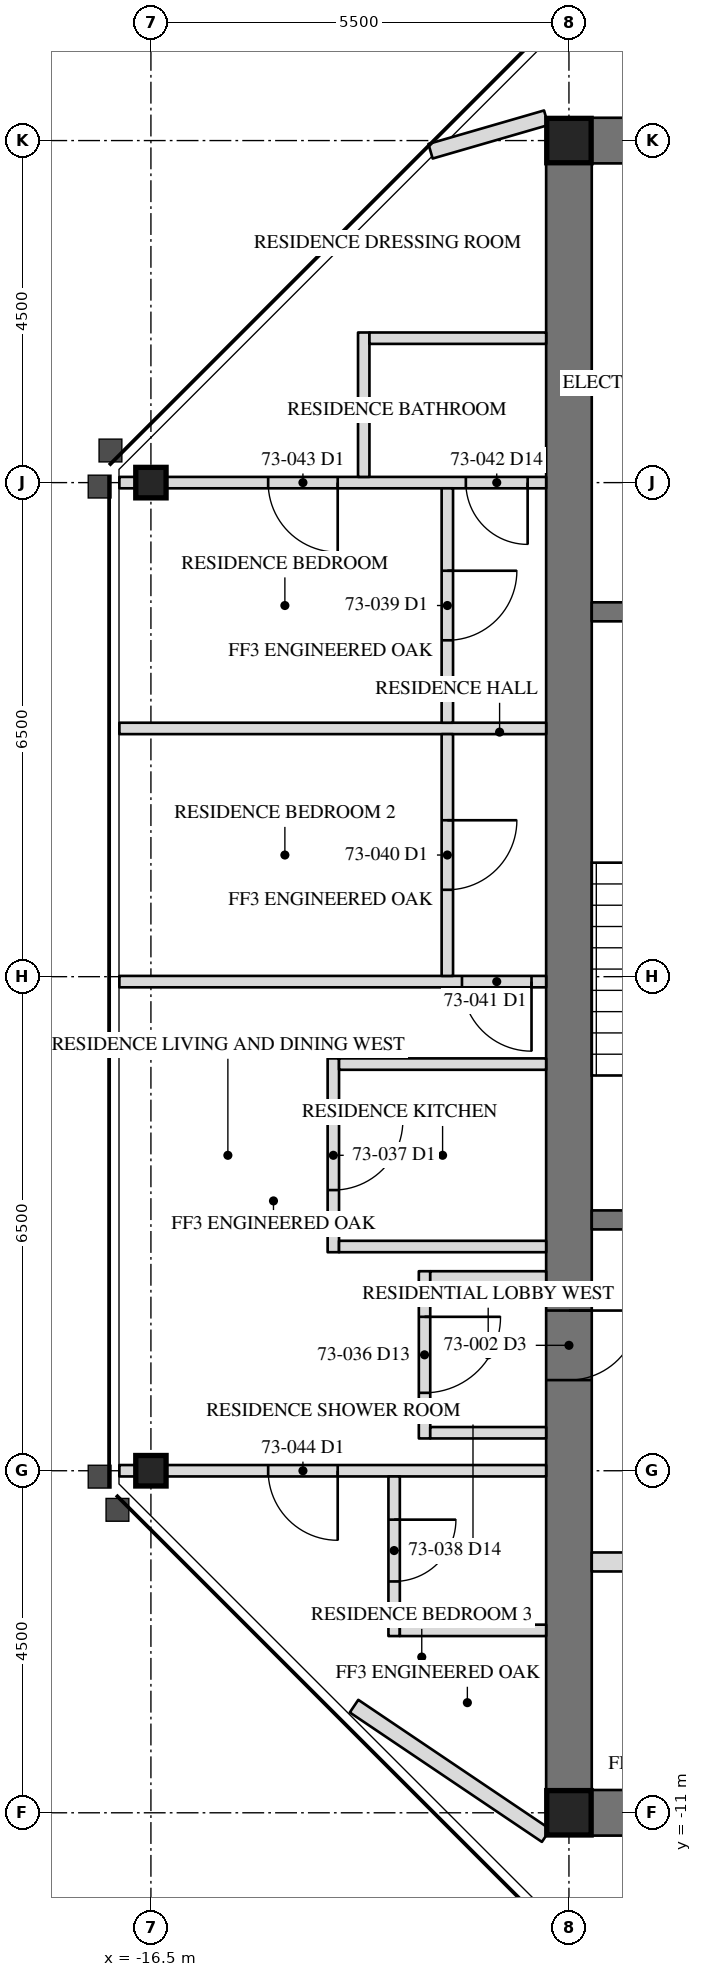
"""IFC4 building model, lengths in metres.
Left out: names, types, materials, properties, quantities, classifications, styles, units other than length and angle.
Written with IfcOpenShell. Run it as: python <this file> out.ifc"""

import sys

from ifc_helpers import new_model, si_unit, direction, frame, frame_2d, origin, origin_2d, place, context, subcontext, project, spatial, rectangle, hollow_rectangle, i_section, extrude, element, fill, save


model = new_model("IFC4")
c1 = context("Model", 3, precision=1e-05, world=origin(), true_north=direction((0.0, 1.0)))
c2 = subcontext(c1, "Body", "Model", "MODEL_VIEW")
j1 = project(units=[si_unit("LENGTHUNIT", "METRE"), si_unit("PLANEANGLEUNIT", "RADIAN")], contexts=[c1])
p1 = place(None, origin())
s1 = spatial("IfcSite", under=j1, at=p1, CompositionType="ELEMENT")
p2 = place(p1, origin())
s2 = spatial("IfcBuilding", under=s1, at=p2, CompositionType="ELEMENT")
p3 = place(p2, frame((0.0, 0.0, 295.6)))
s3 = spatial("IfcBuildingStorey", under=s2, at=p3, CompositionType="ELEMENT", Elevation=295.6)
for number, where, z_axis, x_axis in (
    (1, (-16.5, -6.5, 0.0), (0.0, 0.0, 1.0), (0.0, 1.0, 0.0)),
    (2, (-16.5, 6.5, 0.0), (0.0, 0.0, 1.0), (0.0, 1.0, 0.0)),
):
    element("IfcColumn", number, at=place(p3, frame(where, z_axis=z_axis, x_axis=x_axis)), inside=s3, PredefinedType="COLUMN", context=c2, shape_type="SweptSolid", body=[
        extrude(i_section(OverallWidth=0.401, OverallDepth=0.399, WebThickness=0.025, FlangeThickness=0.04, at=origin_2d()), origin(), (0.0, 0.0, 1.0), 3.6),
    ])
p4 = place(p3, frame((-11.0, 11.0, 0.0), z_axis=(0.0, 0.0, 1.0), x_axis=(0.0, -1.0, 0.0)))
e3 = element("IfcWall", 3, at=p4, inside=s3, PredefinedType="SHEAR", context=c2, shape_type="SweptSolid", body=[
    extrude(rectangle(XDim=22.0, YDim=0.6, at=frame_2d((11.0, 0.0))), origin(), (0.0, 0.0, 1.0), 3.6),
])
p5 = place(p4, frame((15.393, 0.0, 0.0)))
e4 = element("IfcOpeningElement", 4, at=p5, cuts=e3, PredefinedType="OPENING", context=c2, shape_type="SweptSolid", body=[
    extrude(rectangle(XDim=0.915, YDim=2.134, at=frame_2d((0.458, 1.067))), frame((0.0, 0.31, 0.0), z_axis=(0.0, -1.0, 0.0), x_axis=(1.0, 0.0, 0.0)), (0.0, 0.0, 1.0), 0.62),
])
for number, where, z_axis, x_axis in (
    (5, (-6.5, 11.0, 0.0), (0.0, 0.0, 1.0), (-1.0, 0.0, 0.0)),
    (6, (-11.0, -11.0, 0.0), (0.0, 0.0, 1.0), (1.0, 0.0, 0.0)),
):
    element("IfcWall", number, at=place(p3, frame(where, z_axis=z_axis, x_axis=x_axis)), inside=s3, PredefinedType="SHEAR", context=c2, shape_type="SweptSolid", body=[
        extrude(rectangle(XDim=4.5, YDim=0.6, at=frame_2d((2.25, 0.0))), origin(), (0.0, 0.0, 1.0), 3.6),
    ])
for number, where, z_axis, x_axis in (
    (7, (-11.0, 11.0, 0.0), (0.0, 0.0, 1.0), (1.0, 0.0, 0.0)),
    (8, (-11.0, -11.0, 0.0), (0.0, 0.0, 1.0), (1.0, 0.0, 0.0)),
):
    element("IfcColumn", number, at=place(p3, frame(where, z_axis=z_axis, x_axis=x_axis)), inside=s3, PredefinedType="COLUMN", context=c2, shape_type="SweptSolid", body=[
        extrude(hollow_rectangle(XDim=0.584, YDim=0.584, WallThickness=0.051, at=origin_2d()), origin(), (0.0, 0.0, 1.0), 3.6),
    ])
p6 = place(p3, frame((-6.95, 4.8, 0.0), z_axis=(0.0, 0.0, 1.0), x_axis=(-1.0, 0.0, 0.0)))
e9 = element("IfcWall", 9, at=p6, inside=s3, PredefinedType="SOLIDWALL", context=c2, shape_type="SweptSolid", body=[
    extrude(rectangle(XDim=3.75, YDim=0.25, at=frame_2d((1.875, 0.0))), origin(), (0.0, 0.0, 1.0), 3.41),
])
p7 = place(p3, frame((-6.95, -3.2, 0.0), z_axis=(0.0, 0.0, 1.0), x_axis=(-1.0, 0.0, 0.0)))
e10 = element("IfcWall", 10, at=p7, inside=s3, PredefinedType="SOLIDWALL", context=c2, shape_type="SweptSolid", body=[
    extrude(rectangle(XDim=3.75, YDim=0.25, at=frame_2d((1.875, 0.0))), origin(), (0.0, 0.0, 1.0), 3.41),
])
p8 = place(p7, frame((1.342, 0.0, 0.0)))
e11 = element("IfcOpeningElement", 11, at=p8, cuts=e10, PredefinedType="OPENING", context=c2, shape_type="SweptSolid", body=[
    extrude(rectangle(XDim=1.067, YDim=2.134, at=frame_2d((0.533, 1.067))), frame((0.0, 0.135, 0.0), z_axis=(0.0, -1.0, 0.0), x_axis=(1.0, 0.0, 0.0)), (0.0, 0.0, 1.0), 0.27),
])
p9 = place(p3, frame((-6.95, -7.7, 0.0), z_axis=(0.0, 0.0, 1.0), x_axis=(-1.0, 0.0, 0.0)))
e12 = element("IfcWall", 12, at=p9, inside=s3, PredefinedType="PARTITIONING", context=c2, shape_type="SweptSolid", body=[
    extrude(rectangle(XDim=3.75, YDim=0.25, at=frame_2d((1.875, 0.0))), origin(), (0.0, 0.0, 1.0), 3.41),
])
p10 = place(p9, frame((0.45, 0.0, 0.0)))
e13 = element("IfcOpeningElement", 13, at=p10, cuts=e12, PredefinedType="OPENING", context=c2, shape_type="SweptSolid", body=[
    extrude(rectangle(XDim=1.219, YDim=2.134, at=frame_2d((0.609, 1.067))), frame((0.0, 0.135, 0.0), z_axis=(0.0, -1.0, 0.0), x_axis=(1.0, 0.0, 0.0)), (0.0, 0.0, 1.0), 0.27),
])
p11 = place(p3, frame((-11.3, 11.3, 0.0), z_axis=(0.0, 0.0, 1.0), x_axis=(-0.960552344683, -0.278099250491, 0.0)))
e14 = element("IfcWall", 14, at=p11, inside=s3, PredefinedType="PARTITIONING", context=c2, shape_type="SweptSolid", body=[
    extrude(rectangle(XDim=1.584, YDim=0.2, at=frame_2d((0.792, 0.0))), origin(), (0.0, 0.0, 1.0), 3.41),
])
p12 = place(p3, frame((-11.3, -11.3, 0.0), z_axis=(0.0, 0.0, 1.0), x_axis=(-0.829279340477, 0.558834300538, 0.0)))
e15 = element("IfcWall", 15, at=p12, inside=s3, PredefinedType="PARTITIONING", context=c2, shape_type="SweptSolid", body=[
    extrude(rectangle(XDim=3.048, YDim=0.2, at=frame_2d((1.524, 0.0))), origin(), (0.0, 0.0, 1.0), 2.704),
])
p13 = place(p3, frame((-11.3, 6.5, 0.0), z_axis=(0.0, 0.0, 1.0), x_axis=(-1.0, 0.0, 0.0)))
e16 = element("IfcWall", 16, at=p13, inside=s3, PredefinedType="PARTITIONING", context=c2, shape_type="SweptSolid", body=[
    extrude(rectangle(XDim=5.615, YDim=0.15, at=frame_2d((2.808, 0.0))), origin(), (0.0, 0.0, 1.0), 2.966),
])
p14 = place(p13, frame((0.243, 0.0, 0.0)))
e17 = element("IfcOpeningElement", 17, at=p14, cuts=e16, PredefinedType="OPENING", context=c2, shape_type="SweptSolid", body=[
    extrude(rectangle(XDim=0.813, YDim=2.032, at=frame_2d((0.406, 1.016))), frame((0.0, 0.085, 0.0), z_axis=(0.0, -1.0, 0.0), x_axis=(1.0, 0.0, 0.0)), (0.0, 0.0, 1.0), 0.17),
])
p15 = place(p13, frame((2.742, 0.0, 0.0)))
e18 = element("IfcOpeningElement", 18, at=p15, cuts=e16, PredefinedType="OPENING", context=c2, shape_type="SweptSolid", body=[
    extrude(rectangle(XDim=0.915, YDim=2.134, at=frame_2d((0.458, 1.067))), frame((0.0, 0.085, 0.0), z_axis=(0.0, -1.0, 0.0), x_axis=(1.0, 0.0, 0.0)), (0.0, 0.0, 1.0), 0.17),
])
p16 = place(p3, frame((-11.3, 3.266, 0.0), z_axis=(0.0, 0.0, 1.0), x_axis=(-1.0, 0.0, 0.0)))
e19 = element("IfcWall", 19, at=p16, inside=s3, PredefinedType="PARTITIONING", context=c2, shape_type="SweptSolid", body=[
    extrude(rectangle(XDim=5.615, YDim=0.15, at=frame_2d((2.808, 0.0))), origin(), (0.0, 0.0, 1.0), 2.709),
])
p17 = place(p3, frame((-11.3, -0.065, 0.0), z_axis=(0.0, 0.0, 1.0), x_axis=(-1.0, 0.0, 0.0)))
e20 = element("IfcWall", 20, at=p17, inside=s3, PredefinedType="PARTITIONING", context=c2, shape_type="SweptSolid", body=[
    extrude(rectangle(XDim=5.615, YDim=0.15, at=frame_2d((2.808, 0.0))), origin(), (0.0, 0.0, 1.0), 2.709),
])
p18 = place(p17, frame((0.192, 0.0, 0.0)))
e21 = element("IfcOpeningElement", 21, at=p18, cuts=e20, PredefinedType="OPENING", context=c2, shape_type="SweptSolid", body=[
    extrude(rectangle(XDim=0.915, YDim=2.134, at=frame_2d((0.458, 1.067))), frame((0.0, 0.085, 0.0), z_axis=(0.0, -1.0, 0.0), x_axis=(1.0, 0.0, 0.0)), (0.0, 0.0, 1.0), 0.17),
])
p19 = place(p3, frame((-11.3, -6.5, 0.0), z_axis=(0.0, 0.0, 1.0), x_axis=(-1.0, 0.0, 0.0)))
e22 = element("IfcWall", 22, at=p19, inside=s3, PredefinedType="PARTITIONING", context=c2, shape_type="SweptSolid", body=[
    extrude(rectangle(XDim=5.615, YDim=0.15, at=frame_2d((2.808, 0.0))), origin(), (0.0, 0.0, 1.0), 2.966),
])
p20 = place(p19, frame((2.742, 0.0, 0.0)))
e23 = element("IfcOpeningElement", 23, at=p20, cuts=e22, PredefinedType="OPENING", context=c2, shape_type="SweptSolid", body=[
    extrude(rectangle(XDim=0.915, YDim=2.134, at=frame_2d((0.458, 1.067))), frame((0.0, 0.085, 0.0), z_axis=(0.0, -1.0, 0.0), x_axis=(1.0, 0.0, 0.0)), (0.0, 0.0, 1.0), 0.17),
])
p21 = place(p3, frame((-12.9, -3.875, 0.0), z_axis=(0.0, 0.0, 1.0), x_axis=(0.0, -1.0, 0.0)))
e24 = element("IfcWall", 24, at=p21, inside=s3, PredefinedType="PARTITIONING", context=c2, shape_type="SweptSolid", body=[
    extrude(rectangle(XDim=2.2, YDim=0.15, at=frame_2d((1.1, 0.0))), origin(), (0.0, 0.0, 1.0), 3.41),
])
p22 = place(p21, frame((0.6, 0.0, 0.0)))
e25 = element("IfcOpeningElement", 25, at=p22, cuts=e24, PredefinedType="OPENING", context=c2, shape_type="SweptSolid", body=[
    extrude(rectangle(XDim=1.0, YDim=2.134, at=frame_2d((0.5, 1.067))), frame((0.0, 0.085, 0.0), z_axis=(0.0, -1.0, 0.0), x_axis=(1.0, 0.0, 0.0)), (0.0, 0.0, 1.0), 0.17),
])
for number, where, z_axis, x_axis in (
    (26, (-11.3, -3.95, 0.0), (0.0, 0.0, 1.0), (-1.0, 0.0, 0.0)),
    (27, (-11.3, -6.0, 0.0), (0.0, 0.0, 1.0), (-1.0, 0.0, 0.0)),
):
    element("IfcWall", number, at=place(p3, frame(where, z_axis=z_axis, x_axis=x_axis)), inside=s3, PredefinedType="PARTITIONING", context=c2, shape_type="SweptSolid", body=[
        extrude(rectangle(XDim=1.525, YDim=0.15, at=frame_2d((0.762, 0.0))), origin(), (0.0, 0.0, 1.0), 3.41),
    ])
p23 = place(p3, frame((-14.1, -1.075, 0.0), z_axis=(0.0, 0.0, 1.0), x_axis=(0.0, -1.0, 0.0)))
e28 = element("IfcWall", 28, at=p23, inside=s3, PredefinedType="PARTITIONING", context=c2, shape_type="SweptSolid", body=[
    extrude(rectangle(XDim=2.55, YDim=0.15, at=frame_2d((1.275, 0.0))), origin(), (0.0, 0.0, 1.0), 3.41),
])
p24 = place(p23, frame((0.817, 0.0, 0.0)))
e29 = element("IfcOpeningElement", 29, at=p24, cuts=e28, PredefinedType="OPENING", context=c2, shape_type="SweptSolid", body=[
    extrude(rectangle(XDim=0.915, YDim=2.134, at=frame_2d((0.458, 1.067))), frame((0.0, 0.085, 0.0), z_axis=(0.0, -1.0, 0.0), x_axis=(1.0, 0.0, 0.0)), (0.0, 0.0, 1.0), 0.17),
])
for number, where, z_axis, x_axis in (
    (30, (-11.3, -1.15, 0.0), (0.0, 0.0, 1.0), (-1.0, 0.0, 0.0)),
    (31, (-11.3, -3.55, 0.0), (0.0, 0.0, 1.0), (-1.0, 0.0, 0.0)),
):
    element("IfcWall", number, at=place(p3, frame(where, z_axis=z_axis, x_axis=x_axis)), inside=s3, PredefinedType="PARTITIONING", context=c2, shape_type="SweptSolid", body=[
        extrude(rectangle(XDim=2.725, YDim=0.15, at=frame_2d((1.362, 0.0))), origin(), (0.0, 0.0, 1.0), 3.41),
    ])
p25 = place(p3, frame((-13.3, -6.575, 0.0), z_axis=(0.0, 0.0, 1.0), x_axis=(0.0, -1.0, 0.0)))
e32 = element("IfcWall", 32, at=p25, inside=s3, PredefinedType="PARTITIONING", context=c2, shape_type="SweptSolid", body=[
    extrude(rectangle(XDim=2.1, YDim=0.15, at=frame_2d((1.05, 0.0))), origin(), (0.0, 0.0, 1.0), 3.41),
])
p26 = place(p25, frame((0.569, 0.0, 0.0)))
e33 = element("IfcOpeningElement", 33, at=p26, cuts=e32, PredefinedType="OPENING", context=c2, shape_type="SweptSolid", body=[
    extrude(rectangle(XDim=0.813, YDim=2.032, at=frame_2d((0.406, 1.016))), frame((0.0, 0.085, 0.0), z_axis=(0.0, -1.0, 0.0), x_axis=(1.0, 0.0, 0.0)), (0.0, 0.0, 1.0), 0.17),
])
p27 = place(p3, frame((-11.3, -8.6, 0.0), z_axis=(0.0, 0.0, 1.0), x_axis=(-1.0, 0.0, 0.0)))
e34 = element("IfcWall", 34, at=p27, inside=s3, PredefinedType="PARTITIONING", context=c2, shape_type="SweptSolid", body=[
    extrude(rectangle(XDim=1.925, YDim=0.15, at=frame_2d((0.962, 0.0))), origin(), (0.0, 0.0, 1.0), 3.41),
])
p28 = place(p3, frame((-12.6, 6.425, 0.0), z_axis=(0.0, 0.0, 1.0), x_axis=(0.0, -1.0, 0.0)))
e35 = element("IfcWall", 35, at=p28, inside=s3, PredefinedType="PARTITIONING", context=c2, shape_type="SweptSolid", body=[
    extrude(rectangle(XDim=3.084, YDim=0.15, at=frame_2d((1.542, 0.0))), origin(), (0.0, 0.0, 1.0), 3.41),
])
p29 = place(p28, frame((1.084, 0.0, 0.0)))
e36 = element("IfcOpeningElement", 36, at=p29, cuts=e35, PredefinedType="OPENING", context=c2, shape_type="SweptSolid", body=[
    extrude(rectangle(XDim=0.915, YDim=2.134, at=frame_2d((0.458, 1.067))), frame((0.0, 0.085, 0.0), z_axis=(0.0, -1.0, 0.0), x_axis=(1.0, 0.0, 0.0)), (0.0, 0.0, 1.0), 0.17),
])
p30 = place(p3, frame((-12.6, 3.191, 0.0), z_axis=(0.0, 0.0, 1.0), x_axis=(0.0, -1.0, 0.0)))
e37 = element("IfcWall", 37, at=p30, inside=s3, PredefinedType="PARTITIONING", context=c2, shape_type="SweptSolid", body=[
    extrude(rectangle(XDim=3.181, YDim=0.15, at=frame_2d((1.59, 0.0))), origin(), (0.0, 0.0, 1.0), 3.41),
])
p31 = place(p30, frame((1.133, 0.0, 0.0)))
e38 = element("IfcOpeningElement", 38, at=p31, cuts=e37, PredefinedType="OPENING", context=c2, shape_type="SweptSolid", body=[
    extrude(rectangle(XDim=0.915, YDim=2.134, at=frame_2d((0.458, 1.067))), frame((0.0, 0.085, 0.0), z_axis=(0.0, -1.0, 0.0), x_axis=(1.0, 0.0, 0.0)), (0.0, 0.0, 1.0), 0.17),
])
p32 = place(p3, frame((-13.7, 6.575, 0.0), z_axis=(0.0, 0.0, 1.0), x_axis=(0.0, 1.0, 0.0)))
e39 = element("IfcWall", 39, at=p32, inside=s3, PredefinedType="PARTITIONING", context=c2, shape_type="SweptSolid", body=[
    extrude(rectangle(XDim=1.9, YDim=0.15, at=frame_2d((0.95, 0.0))), origin(), (0.0, 0.0, 1.0), 3.41),
])
p33 = place(p3, frame((-11.3, 8.4, 0.0), z_axis=(0.0, 0.0, 1.0), x_axis=(-1.0, 0.0, 0.0)))
e40 = element("IfcWall", 40, at=p33, inside=s3, PredefinedType="PARTITIONING", context=c2, shape_type="SweptSolid", body=[
    extrude(rectangle(XDim=2.325, YDim=0.15, at=frame_2d((1.163, 0.0))), origin(), (0.0, 0.0, 1.0), 3.41),
])
p34 = place(p5, origin())
e41 = element("IfcDoor", 41, at=p34, inside=s3, OperationType="SINGLE_SWING_RIGHT", PredefinedType="DOOR", context=c2, shape_type="SweptSolid", body=[
    extrude(rectangle(XDim=0.915, YDim=2.134, at=frame_2d((0.458, 1.067))), frame((0.0, -0.225, 0.0), z_axis=(0.0, -1.0, 0.0), x_axis=(1.0, 0.0, 0.0)), (0.0, 0.0, 1.0), 0.05),
])
fill(e4, e41)
p35 = place(p22, origin())
e42 = element("IfcDoor", 42, at=p35, inside=s3, OperationType="SINGLE_SWING_RIGHT", PredefinedType="DOOR", context=c2, shape_type="SweptSolid", body=[
    extrude(rectangle(XDim=1.0, YDim=2.134, at=frame_2d((0.5, 1.067))), frame((0.0, 0.025, 0.0), z_axis=(0.0, -1.0, 0.0), x_axis=(1.0, 0.0, 0.0)), (0.0, 0.0, 1.0), 0.05),
])
fill(e25, e42)
p36 = place(p24, origin())
e43 = element("IfcDoor", 43, at=p36, inside=s3, OperationType="SINGLE_SWING_LEFT", PredefinedType="DOOR", context=c2, shape_type="SweptSolid", body=[
    extrude(rectangle(XDim=0.915, YDim=2.134, at=frame_2d((0.458, 1.067))), frame((0.0, 0.025, 0.0), z_axis=(0.0, -1.0, 0.0), x_axis=(1.0, 0.0, 0.0)), (0.0, 0.0, 1.0), 0.05),
])
fill(e29, e43)
p37 = place(p26, origin())
e44 = element("IfcDoor", 44, at=p37, inside=s3, OperationType="SINGLE_SWING_LEFT", PredefinedType="DOOR", context=c2, shape_type="SweptSolid", body=[
    extrude(rectangle(XDim=0.813, YDim=2.032, at=frame_2d((0.406, 1.016))), frame((0.0, 0.025, 0.0), z_axis=(0.0, -1.0, 0.0), x_axis=(1.0, 0.0, 0.0)), (0.0, 0.0, 1.0), 0.05),
])
fill(e33, e44)
p38 = place(p29, origin())
e45 = element("IfcDoor", 45, at=p38, inside=s3, OperationType="SINGLE_SWING_LEFT", PredefinedType="DOOR", context=c2, shape_type="SweptSolid", body=[
    extrude(rectangle(XDim=0.915, YDim=2.134, at=frame_2d((0.458, 1.067))), frame((0.0, 0.025, 0.0), z_axis=(0.0, -1.0, 0.0), x_axis=(1.0, 0.0, 0.0)), (0.0, 0.0, 1.0), 0.05),
])
fill(e36, e45)
p39 = place(p31, origin())
e46 = element("IfcDoor", 46, at=p39, inside=s3, OperationType="SINGLE_SWING_LEFT", PredefinedType="DOOR", context=c2, shape_type="SweptSolid", body=[
    extrude(rectangle(XDim=0.915, YDim=2.134, at=frame_2d((0.458, 1.067))), frame((0.0, 0.025, 0.0), z_axis=(0.0, -1.0, 0.0), x_axis=(1.0, 0.0, 0.0)), (0.0, 0.0, 1.0), 0.05),
])
fill(e38, e46)
p40 = place(p18, origin())
e47 = element("IfcDoor", 47, at=p40, inside=s3, OperationType="SINGLE_SWING_LEFT", PredefinedType="DOOR", context=c2, shape_type="SweptSolid", body=[
    extrude(rectangle(XDim=0.915, YDim=2.134, at=frame_2d((0.458, 1.067))), frame((0.0, 0.025, 0.0), z_axis=(0.0, -1.0, 0.0), x_axis=(1.0, 0.0, 0.0)), (0.0, 0.0, 1.0), 0.05),
])
fill(e21, e47)
p41 = place(p14, origin())
e48 = element("IfcDoor", 48, at=p41, inside=s3, OperationType="SINGLE_SWING_LEFT", PredefinedType="DOOR", context=c2, shape_type="SweptSolid", body=[
    extrude(rectangle(XDim=0.813, YDim=2.032, at=frame_2d((0.406, 1.016))), frame((0.0, 0.025, 0.0), z_axis=(0.0, -1.0, 0.0), x_axis=(1.0, 0.0, 0.0)), (0.0, 0.0, 1.0), 0.05),
])
fill(e17, e48)
p42 = place(p15, origin())
e49 = element("IfcDoor", 49, at=p42, inside=s3, OperationType="SINGLE_SWING_LEFT", PredefinedType="DOOR", context=c2, shape_type="SweptSolid", body=[
    extrude(rectangle(XDim=0.915, YDim=2.134, at=frame_2d((0.458, 1.067))), frame((0.0, 0.025, 0.0), z_axis=(0.0, -1.0, 0.0), x_axis=(1.0, 0.0, 0.0)), (0.0, 0.0, 1.0), 0.05),
])
fill(e18, e49)
p43 = place(p20, origin())
e50 = element("IfcDoor", 50, at=p43, inside=s3, OperationType="SINGLE_SWING_LEFT", PredefinedType="DOOR", context=c2, shape_type="SweptSolid", body=[
    extrude(rectangle(XDim=0.915, YDim=2.134, at=frame_2d((0.458, 1.067))), frame((0.0, 0.025, 0.0), z_axis=(0.0, -1.0, 0.0), x_axis=(1.0, 0.0, 0.0)), (0.0, 0.0, 1.0), 0.05),
])
fill(e23, e50)
save(model, sys.argv[1])
